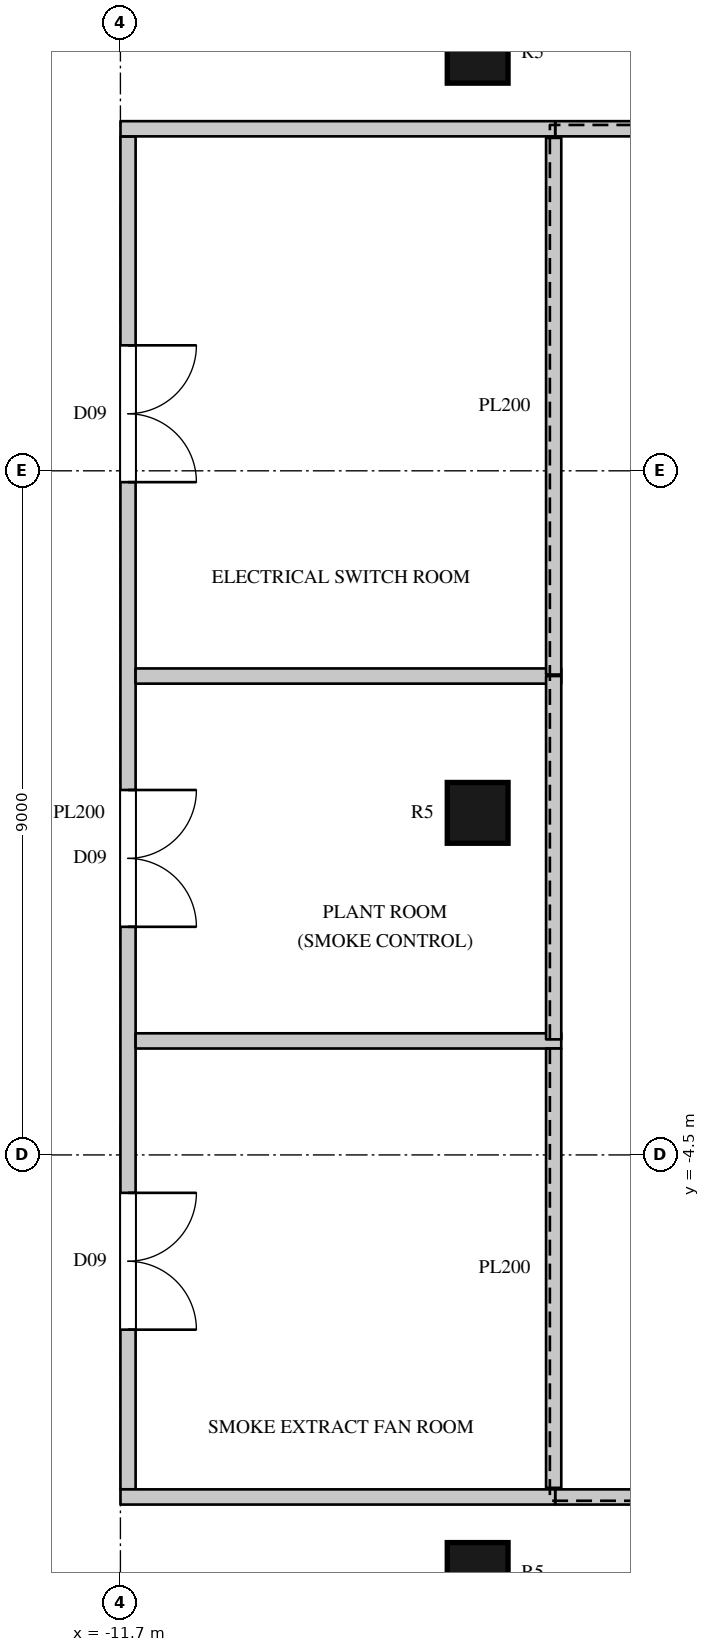
"""IFC4 building model, lengths in metres.
Left out: names, types, materials, properties, quantities, classifications, styles, units other than length and angle.
Written with IfcOpenShell. Run it as: python <this file> out.ifc"""

import sys

from ifc_helpers import new_model, si_unit, direction, frame, frame_2d, origin, origin_2d, place, context, subcontext, project, spatial, rectangle, circle, extrude, element, fill, save


model = new_model("IFC4")
c1 = context("Model", 3, precision=1e-05, world=origin(), true_north=direction((0.0, 1.0)))
c2 = subcontext(c1, "Body", "Model", "MODEL_VIEW")
j1 = project(units=[si_unit("LENGTHUNIT", "METRE"), si_unit("PLANEANGLEUNIT", "RADIAN")], contexts=[c1])
p1 = place(None, origin())
s1 = spatial("IfcSite", under=j1, at=p1, CompositionType="ELEMENT")
p2 = place(p1, origin())
s2 = spatial("IfcBuilding", under=s1, at=p2, CompositionType="ELEMENT")
p3 = place(p2, frame((0.0, 0.0, 343.0)))
s3 = spatial("IfcBuildingStorey", under=s2, at=p3, CompositionType="ELEMENT", Elevation=343.0)
for number, where, z_axis, x_axis in (
    (1, (-7.0, -10.0, 0.0), (0.0, 0.0, 1.0), (1.0, 0.0, 0.0)),
    (2, (-7.0, 0.0, 0.0), (0.0, 0.0, 1.0), (1.0, 0.0, 0.0)),
    (3, (-7.0, 10.0, 0.0), (0.0, 0.0, 1.0), (1.0, 0.0, 0.0)),
):
    element("IfcColumn", number, at=place(p3, frame(where, z_axis=z_axis, x_axis=x_axis)), inside=s3, PredefinedType="COLUMN", context=c2, shape_type="SweptSolid", body=[
        extrude(circle(Radius=0.4, at=origin_2d()), origin(), (0.0, 0.0, 1.0), 4.0),
    ])
for number, where, z_axis, x_axis in (
    (4, (-5.98, -9.0, 0.0), (0.0, 0.0, 1.0), (1.0, 0.0, 0.0)),
    (5, (-5.98, 9.0, 0.0), (0.0, 0.0, 1.0), (1.0, 0.0, 0.0)),
):
    element("IfcWall", number, at=place(p3, frame(where, z_axis=z_axis, x_axis=x_axis)), inside=s3, PredefinedType="PARTITIONING", context=c2, shape_type="SweptSolid", body=[
        extrude(rectangle(XDim=13.96, YDim=0.2, at=frame_2d((6.98, 0.0))), origin(), (0.0, 0.0, 1.0), 3.598),
    ])
p4 = place(p3, frame((-11.6, -8.899, 0.0), z_axis=(0.0, 0.0, 1.0), x_axis=(0.0, 1.0, 0.0)))
e6 = element("IfcWall", 6, at=p4, inside=s3, PredefinedType="PARTITIONING", context=c2, shape_type="SweptSolid", body=[
    extrude(rectangle(XDim=17.798, YDim=0.2, at=frame_2d((8.899, 0.0))), origin(), (0.0, 0.0, 1.0), 3.598),
])
p5 = place(p4, frame((2.1, 0.0, 0.0)))
e7 = element("IfcOpeningElement", 7, at=p5, cuts=e6, PredefinedType="OPENING", context=c2, shape_type="SweptSolid", body=[
    extrude(rectangle(XDim=1.8, YDim=2.4, at=frame_2d((0.9, 1.2))), frame((0.0, 0.11, 0.0), z_axis=(0.0, -1.0, 0.0), x_axis=(1.0, 0.0, 0.0)), (0.0, 0.0, 1.0), 0.22),
])
p6 = place(p4, frame((7.4, 0.0, 0.0)))
e8 = element("IfcOpeningElement", 8, at=p6, cuts=e6, PredefinedType="OPENING", context=c2, shape_type="SweptSolid", body=[
    extrude(rectangle(XDim=1.8, YDim=2.4, at=frame_2d((0.9, 1.2))), frame((0.0, 0.11, 0.0), z_axis=(0.0, -1.0, 0.0), x_axis=(1.0, 0.0, 0.0)), (0.0, 0.0, 1.0), 0.22),
])
p7 = place(p4, frame((13.25, 0.0, 0.0)))
e9 = element("IfcOpeningElement", 9, at=p7, cuts=e6, PredefinedType="OPENING", context=c2, shape_type="SweptSolid", body=[
    extrude(rectangle(XDim=1.8, YDim=2.4, at=frame_2d((0.9, 1.2))), frame((0.0, 0.11, 0.0), z_axis=(0.0, -1.0, 0.0), x_axis=(1.0, 0.0, 0.0)), (0.0, 0.0, 1.0), 0.22),
])
for number, where, z_axis, x_axis in (
    (10, (-11.5, -3.0, 0.0), (0.0, 0.0, 1.0), (1.0, 0.0, 0.0)),
    (11, (-11.5, 1.8, 0.0), (0.0, 0.0, 1.0), (1.0, 0.0, 0.0)),
):
    element("IfcWall", number, at=place(p3, frame(where, z_axis=z_axis, x_axis=x_axis)), inside=s3, PredefinedType="PARTITIONING", context=c2, shape_type="SweptSolid", body=[
        extrude(rectangle(XDim=5.6, YDim=0.2, at=frame_2d((2.8, 0.0))), origin(), (0.0, 0.0, 1.0), 3.598),
    ])
for number, where, z_axis, x_axis in (
    (12, (-11.699, -9.0, 0.0), (0.0, 0.0, 1.0), (1.0, 0.0, 0.0)),
    (13, (-11.699, 9.0, 0.0), (0.0, 0.0, 1.0), (1.0, 0.0, 0.0)),
):
    element("IfcWall", number, at=place(p3, frame(where, z_axis=z_axis, x_axis=x_axis)), inside=s3, PredefinedType="PARTITIONING", context=c2, shape_type="SweptSolid", body=[
        extrude(rectangle(XDim=5.719, YDim=0.2, at=frame_2d((2.859, 0.0))), origin(), (0.0, 0.0, 1.0), 3.598),
    ])
p8 = place(p3, frame((-6.0, -8.88, 0.0), z_axis=(0.0, 0.0, 1.0), x_axis=(0.0, 1.0, 0.0)))
e14 = element("IfcWall", 14, at=p8, inside=s3, PredefinedType="PARTITIONING", context=c2, shape_type="SweptSolid", body=[
    extrude(rectangle(XDim=5.78, YDim=0.2, at=frame_2d((2.89, 0.0))), origin(), (0.0, 0.0, 1.0), 3.598),
])
p9 = place(p3, frame((-6.0, -2.98, 0.0), z_axis=(0.0, 0.0, 1.0), x_axis=(0.0, 1.0, 0.0)))
e15 = element("IfcWall", 15, at=p9, inside=s3, PredefinedType="PARTITIONING", context=c2, shape_type="SweptSolid", body=[
    extrude(rectangle(XDim=4.78, YDim=0.2, at=frame_2d((2.39, 0.0))), origin(), (0.0, 0.0, 1.0), 3.598),
])
p10 = place(p3, frame((-6.0, 1.82, 0.0), z_axis=(0.0, 0.0, 1.0), x_axis=(0.0, 1.0, 0.0)))
e16 = element("IfcWall", 16, at=p10, inside=s3, PredefinedType="PARTITIONING", context=c2, shape_type="SweptSolid", body=[
    extrude(rectangle(XDim=7.06, YDim=0.2, at=frame_2d((3.53, 0.0))), origin(), (0.0, 0.0, 1.0), 3.598),
])
p11 = place(p5, origin())
e17 = element("IfcDoor", 17, at=p11, inside=s3, OperationType="DOUBLE_DOOR_SINGLE_SWING", PredefinedType="DOOR", context=c2, shape_type="SweptSolid", body=[
    extrude(rectangle(XDim=1.8, YDim=2.4, at=frame_2d((0.9, 1.2))), frame((0.0, 0.025, 0.0), z_axis=(0.0, -1.0, 0.0), x_axis=(1.0, 0.0, 0.0)), (0.0, 0.0, 1.0), 0.05),
])
fill(e7, e17)
p12 = place(p6, origin())
e18 = element("IfcDoor", 18, at=p12, inside=s3, OperationType="DOUBLE_DOOR_SINGLE_SWING", PredefinedType="DOOR", context=c2, shape_type="SweptSolid", body=[
    extrude(rectangle(XDim=1.8, YDim=2.4, at=frame_2d((0.9, 1.2))), frame((0.0, 0.025, 0.0), z_axis=(0.0, -1.0, 0.0), x_axis=(1.0, 0.0, 0.0)), (0.0, 0.0, 1.0), 0.05),
])
fill(e8, e18)
p13 = place(p7, origin())
e19 = element("IfcDoor", 19, at=p13, inside=s3, OperationType="DOUBLE_DOOR_SINGLE_SWING", PredefinedType="DOOR", context=c2, shape_type="SweptSolid", body=[
    extrude(rectangle(XDim=1.8, YDim=2.4, at=frame_2d((0.9, 1.2))), frame((0.0, 0.025, 0.0), z_axis=(0.0, -1.0, 0.0), x_axis=(1.0, 0.0, 0.0)), (0.0, 0.0, 1.0), 0.05),
])
fill(e9, e19)
save(model, sys.argv[1])
